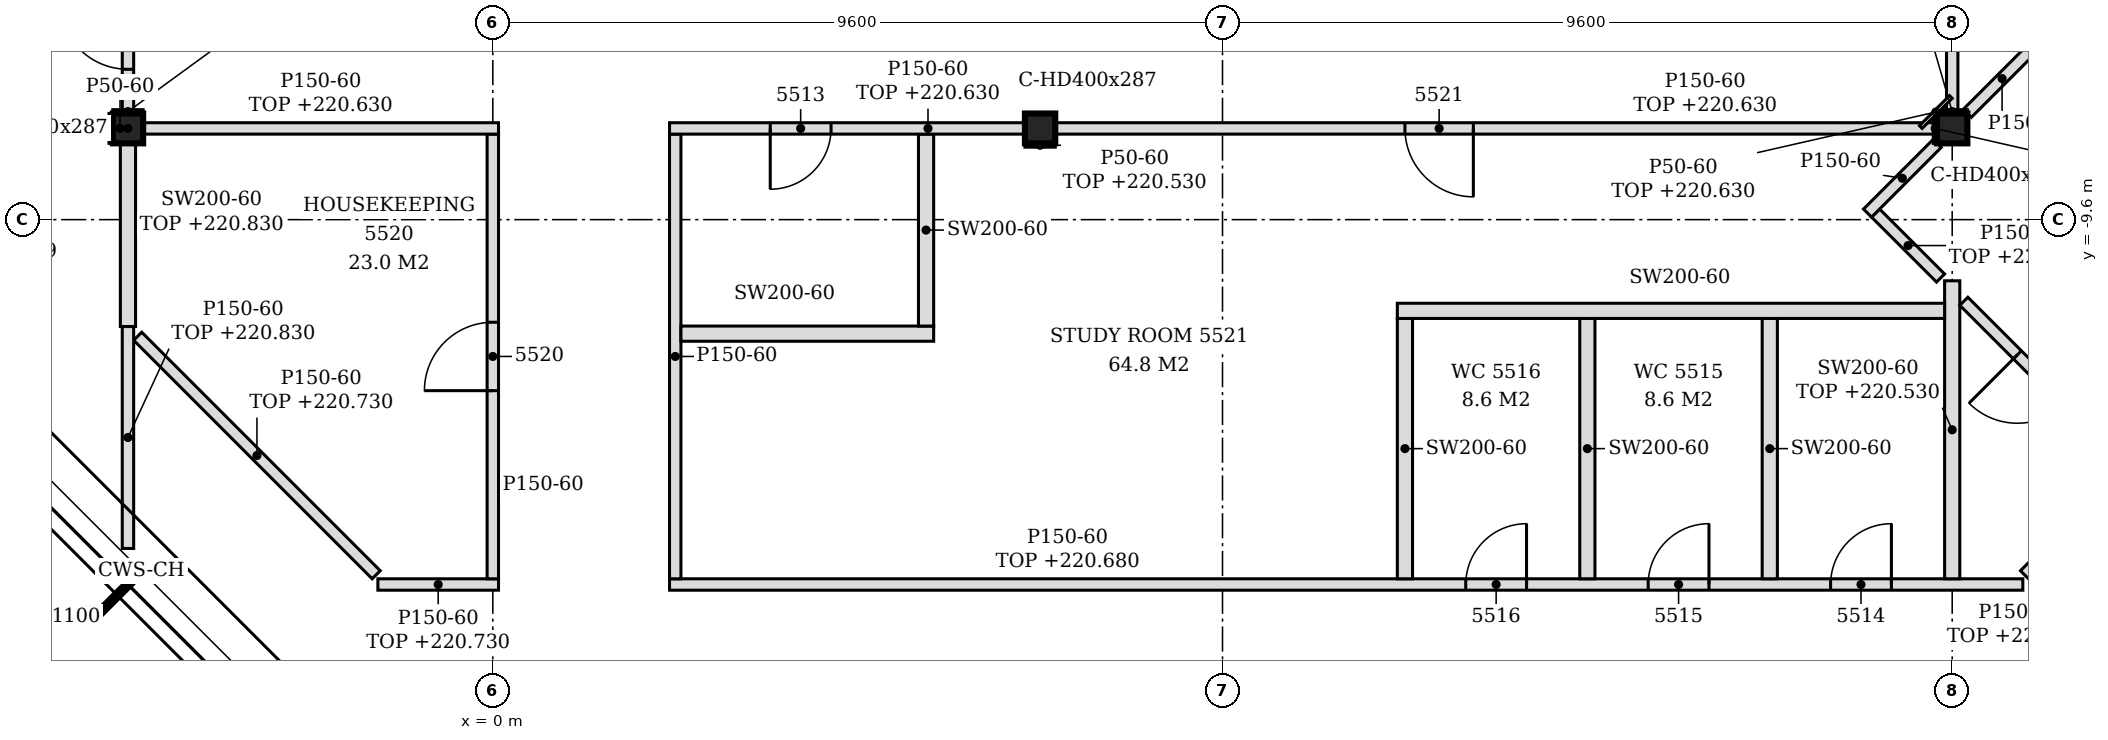
"""IFC4 building model, lengths in metres.
Left out: names, types, materials, properties, quantities, classifications, styles, units other than length and angle.
Written with IfcOpenShell. Run it as: python <this file> out.ifc"""

import sys

from ifc_helpers import new_model, si_unit, direction, frame, frame_2d, origin, origin_2d, place, context, subcontext, project, spatial, polyline, rectangle, i_section, outline, extrude, element, fill, save


model = new_model("IFC4")
c1 = context("Model", 3, precision=1e-05, world=origin(), true_north=direction((0.0, 1.0)))
c2 = subcontext(c1, "Body", "Model", "MODEL_VIEW")
j1 = project(units=[si_unit("LENGTHUNIT", "METRE"), si_unit("PLANEANGLEUNIT", "RADIAN")], contexts=[c1])
p1 = place(None, origin())
s1 = spatial("IfcSite", under=j1, at=p1, CompositionType="ELEMENT")
p2 = place(p1, origin())
s2 = spatial("IfcBuilding", under=s1, at=p2, CompositionType="ELEMENT")
p3 = place(p2, frame((0.0, 0.0, 217.8)))
s3 = spatial("IfcBuildingStorey", under=s2, at=p3, CompositionType="ELEMENT", Elevation=217.8)
for number, where, z_axis, x_axis in (
    (1, (-4.8, -8.4, -0.15), (0.0, 0.0, 1.0), (1.0, 0.0, 0.0)),
    (2, (7.2, -8.4, -0.15), (0.0, 0.0, 1.0), (1.0, 0.0, 0.0)),
    (3, (19.2, -8.4, -0.15), (0.0, 0.0, 1.0), (1.0, 0.0, 0.0)),
):
    element("IfcColumn", number, at=place(p3, frame(where, z_axis=z_axis, x_axis=x_axis)), inside=s3, PredefinedType="COLUMN", context=c2, shape_type="SweptSolid", body=[
        extrude(i_section(OverallWidth=0.399, OverallDepth=0.393, WebThickness=0.023, FlangeThickness=0.037, FilletRadius=0.015, at=origin_2d()), origin(), (0.0, 0.0, 1.0), 3.6),
    ])
p4 = place(p3, frame((-1.512, -14.4, 0.0), z_axis=(0.0, 0.0, 1.0), x_axis=(1.0, 0.0, 0.0)))
e4 = element("IfcWall", 4, at=p4, inside=s3, PredefinedType="PARTITIONING", context=c2, shape_type="SweptSolid", body=[
    extrude(rectangle(XDim=1.587, YDim=0.15, at=frame_2d((0.793, 0.0))), origin(), (0.0, 0.0, 1.0), 2.93),
])
p5 = place(p3, frame((2.325, -14.4, 0.0), z_axis=(0.0, 0.0, 1.0), x_axis=(1.0, 0.0, 0.0)))
e5 = element("IfcWall", 5, at=p5, inside=s3, PredefinedType="PARTITIONING", context=c2, shape_type="SweptSolid", body=[
    extrude(outline(polyline([(0.0, 0.0), (17.804, 0.0), (17.804, 2.88), (17.025, 2.88), (17.023, 2.73), (16.725, 2.73), (16.723, 2.88), (5.025, 2.88), (5.023, 2.73), (4.725, 2.73), (4.723, 2.88), (0.0, 2.88), (0.0, 0.0)])), frame((0.0, 0.075, 0.0), z_axis=(0.0, -1.0, 0.0), x_axis=(1.0, 0.0, 0.0)), (0.0, 0.0, 1.0), 0.15),
])
p6 = place(p5, frame((15.275, 0.0, 0.0)))
e6 = element("IfcOpeningElement", 6, at=p6, cuts=e5, PredefinedType="OPENING", context=c2, shape_type="SweptSolid", body=[
    extrude(rectangle(XDim=0.8, YDim=2.1, at=frame_2d((0.4, 1.05))), frame((0.0, 0.085, 0.0), z_axis=(0.0, -1.0, 0.0), x_axis=(1.0, 0.0, 0.0)), (0.0, 0.0, 1.0), 0.17),
])
p7 = place(p5, frame((12.875, 0.0, 0.0)))
e7 = element("IfcOpeningElement", 7, at=p7, cuts=e5, PredefinedType="OPENING", context=c2, shape_type="SweptSolid", body=[
    extrude(rectangle(XDim=0.8, YDim=2.1, at=frame_2d((0.4, 1.05))), frame((0.0, 0.085, 0.0), z_axis=(0.0, -1.0, 0.0), x_axis=(1.0, 0.0, 0.0)), (0.0, 0.0, 1.0), 0.17),
])
p8 = place(p5, frame((10.475, 0.0, 0.0)))
e8 = element("IfcOpeningElement", 8, at=p8, cuts=e5, PredefinedType="OPENING", context=c2, shape_type="SweptSolid", body=[
    extrude(rectangle(XDim=0.8, YDim=2.1, at=frame_2d((0.4, 1.05))), frame((0.0, 0.085, 0.0), z_axis=(0.0, -1.0, 0.0), x_axis=(1.0, 0.0, 0.0)), (0.0, 0.0, 1.0), 0.17),
])
p9 = place(p3, frame((-1.534, -14.272, 0.0), z_axis=(0.0, 0.0, 1.0), x_axis=(-0.707134287042, 0.707079274261, 0.0)))
e9 = element("IfcWall", 9, at=p9, inside=s3, PredefinedType="PARTITIONING", context=c2, shape_type="SweptSolid", body=[
    extrude(rectangle(XDim=4.438, YDim=0.15, at=frame_2d((2.219, 0.0))), origin(), (0.0, 0.0, 1.0), 2.93),
])
p10 = place(p3, frame((0.0, -14.325, 0.0), z_axis=(0.0, 0.0, 1.0), x_axis=(0.0, 1.0, 0.0)))
e10 = element("IfcWall", 10, at=p10, inside=s3, PredefinedType="PARTITIONING", context=c2, shape_type="SweptSolid", body=[
    extrude(outline(polyline([(0.0, 0.0), (5.85, 0.0), (5.85, 2.83), (5.775, 2.83), (5.773, 3.45), (0.025, 3.45), (0.023, 2.93), (0.0, 2.93), (0.0, 0.0)])), frame((0.0, 0.075, 0.0), z_axis=(0.0, -1.0, 0.0), x_axis=(1.0, 0.0, 0.0)), (0.0, 0.0, 1.0), 0.15),
])
p11 = place(p10, frame((2.475, 0.0, 0.0)))
e11 = element("IfcOpeningElement", 11, at=p11, cuts=e10, PredefinedType="OPENING", context=c2, shape_type="SweptSolid", body=[
    extrude(rectangle(XDim=0.9, YDim=2.1, at=frame_2d((0.45, 1.05))), frame((0.0, 0.085, 0.0), z_axis=(0.0, -1.0, 0.0), x_axis=(1.0, 0.0, 0.0)), (0.0, 0.0, 1.0), 0.17),
])
p12 = place(p3, frame((2.4, -14.325, 0.0), z_axis=(0.0, 0.0, 1.0), x_axis=(0.0, 1.0, 0.0)))
e12 = element("IfcWall", 12, at=p12, inside=s3, PredefinedType="PARTITIONING", context=c2, shape_type="SweptSolid", body=[
    extrude(outline(polyline([(0.0, 0.0), (5.85, 0.0), (5.85, 2.83), (5.775, 2.83), (5.773, 3.45), (0.025, 3.45), (0.023, 2.93), (0.0, 2.93), (0.0, 0.0)])), frame((0.0, 0.075, 0.0), z_axis=(0.0, -1.0, 0.0), x_axis=(1.0, 0.0, 0.0)), (0.0, 0.0, 1.0), 0.15),
])
for number, where, z_axis, x_axis in (
    (13, (12.0, -14.325, 0.0), (0.0, 0.0, 1.0), (0.0, 1.0, 0.0)),
    (14, (14.4, -14.325, 0.0), (0.0, 0.0, 1.0), (0.0, 1.0, 0.0)),
    (15, (16.8, -14.325, 0.0), (0.0, 0.0, 1.0), (0.0, 1.0, 0.0)),
):
    element("IfcWall", number, at=place(p3, frame(where, z_axis=z_axis, x_axis=x_axis)), inside=s3, PredefinedType="PARTITIONING", context=c2, shape_type="SweptSolid", body=[
        extrude(outline(polyline([(0.0, 0.0), (3.425, 0.0), (3.425, 3.45), (0.03, 3.45), (0.028, 2.88), (0.0, 2.88), (0.0, 0.0)])), frame((0.0, 0.1, 0.0), z_axis=(0.0, -1.0, 0.0), x_axis=(1.0, 0.0, 0.0)), (0.0, 0.0, 1.0), 0.2),
    ])
p13 = place(p3, frame((19.2, -14.325, 0.0), z_axis=(0.0, 0.0, 1.0), x_axis=(0.0, 1.0, 0.0)))
e16 = element("IfcWall", 16, at=p13, inside=s3, PredefinedType="PARTITIONING", context=c2, shape_type="SweptSolid", body=[
    extrude(rectangle(XDim=3.92, YDim=0.2, at=frame_2d((1.96, 0.0))), origin(), (0.0, 0.0, 1.0), 2.73),
])
p14 = place(p3, frame((20.151, -14.272, 0.0), z_axis=(0.0, 0.0, 1.0), x_axis=(0.707106781187, 0.707106781187, 0.0)))
e17 = element("IfcWall", 17, at=p14, inside=s3, PredefinedType="PARTITIONING", context=c2, shape_type="SweptSolid", body=[
    extrude(rectangle(XDim=2.055, YDim=0.15, at=frame_2d((1.027, 0.0))), origin(), (0.0, 0.0, 1.0), 2.88),
])
p15 = place(p3, frame((-4.8, -13.926, 0.0), z_axis=(0.0, 0.0, 1.0), x_axis=(0.0, 1.0, 0.0)))
e18 = element("IfcWall", 18, at=p15, inside=s3, PredefinedType="PARTITIONING", context=c2, shape_type="SweptSolid", body=[
    extrude(outline(polyline([(0.0, 0.0), (2.92, 0.0), (2.92, 3.03), (1.369, 3.03), (1.367, 2.63), (0.229, 2.63), (0.227, 3.03), (0.0, 3.03), (0.0, 0.0)])), frame((0.0, 0.075, 0.0), z_axis=(0.0, -1.0, 0.0), x_axis=(1.0, 0.0, 0.0)), (0.0, 0.0, 1.0), 0.15),
])
p16 = place(p3, frame((21.498, -12.819, 0.0), z_axis=(0.0, 0.0, 1.0), x_axis=(-0.707106781187, 0.707106781187, 0.0)))
e19 = element("IfcWall", 19, at=p16, inside=s3, PredefinedType="PARTITIONING", context=c2, shape_type="SweptSolid", body=[
    extrude(rectangle(XDim=3.033, YDim=0.15, at=frame_2d((1.517, 0.0))), origin(), (0.0, 0.0, 1.0), 2.73),
])
p17 = place(p16, frame((1.137, 0.0, 0.0)))
e20 = element("IfcOpeningElement", 20, at=p17, cuts=e19, PredefinedType="OPENING", context=c2, shape_type="SweptSolid", body=[
    extrude(rectangle(XDim=0.9, YDim=2.1, at=frame_2d((0.45, 1.05))), frame((0.0, 0.085, 0.0), z_axis=(0.0, -1.0, 0.0), x_axis=(1.0, 0.0, 0.0)), (0.0, 0.0, 1.0), 0.17),
])
p18 = place(p3, frame((2.475, -11.1, 0.0), z_axis=(0.0, 0.0, 1.0), x_axis=(1.0, 0.0, 0.0)))
e21 = element("IfcWall", 21, at=p18, inside=s3, PredefinedType="PARTITIONING", context=c2, shape_type="SweptSolid", body=[
    extrude(rectangle(XDim=3.325, YDim=0.2, at=frame_2d((1.663, 0.0))), origin(), (0.0, 0.0, 1.0), 3.45),
])
p19 = place(p3, frame((-4.8, -11.006, 0.0), z_axis=(0.0, 0.0, 1.0), x_axis=(0.0, 1.0, 0.0)))
e22 = element("IfcWall", 22, at=p19, inside=s3, PredefinedType="PARTITIONING", context=c2, shape_type="SweptSolid", body=[
    extrude(rectangle(XDim=2.41, YDim=0.2, at=frame_2d((1.205, 0.0))), origin(), (0.0, 0.0, 1.0), 3.03),
])
p20 = place(p3, frame((5.7, -11.0, 0.0), z_axis=(0.0, 0.0, 1.0), x_axis=(0.0, 1.0, 0.0)))
e23 = element("IfcWall", 23, at=p20, inside=s3, PredefinedType="PARTITIONING", context=c2, shape_type="SweptSolid", body=[
    extrude(outline(polyline([(0.0, 0.0), (2.525, 0.0), (2.525, 2.83), (2.45, 2.83), (2.448, 3.45), (0.0, 3.45), (0.0, 0.0)])), frame((0.0, 0.1, 0.0), z_axis=(0.0, -1.0, 0.0), x_axis=(1.0, 0.0, 0.0)), (0.0, 0.0, 1.0), 0.2),
])
p21 = place(p3, frame((11.9, -10.8, 0.0), z_axis=(0.0, 0.0, 1.0), x_axis=(1.0, 0.0, 0.0)))
e24 = element("IfcWall", 24, at=p21, inside=s3, PredefinedType="PARTITIONING", context=c2, shape_type="SweptSolid", body=[
    extrude(outline(polyline([(0.0, 0.0), (7.2, 0.0), (7.2, 2.73), (7.15, 2.73), (7.148, 3.45), (0.0, 3.45), (0.0, 0.0)])), frame((0.0, 0.1, 0.0), z_axis=(0.0, -1.0, 0.0), x_axis=(1.0, 0.0, 0.0)), (0.0, 0.0, 1.0), 0.2),
])
p22 = place(p3, frame((19.047, -10.368, 0.0), z_axis=(0.0, 0.0, 1.0), x_axis=(-0.707409718716, 0.706803713817, 0.0)))
e25 = element("IfcWall", 25, at=p22, inside=s3, PredefinedType="PARTITIONING", context=c2, shape_type="SweptSolid", body=[
    extrude(rectangle(XDim=1.208, YDim=0.15, at=frame_2d((0.604, 0.0))), origin(), (0.0, 0.0, 1.0), 2.73),
])
p23 = place(p3, frame((18.086, -9.514, 0.0), z_axis=(0.0, 0.0, 1.0), x_axis=(0.707106781187, 0.707106781187, 0.0)))
e26 = element("IfcWall", 26, at=p23, inside=s3, PredefinedType="PARTITIONING", context=c2, shape_type="SweptSolid", body=[
    extrude(rectangle(XDim=1.295, YDim=0.15, at=frame_2d((0.648, 0.0))), origin(), (0.0, 0.0, 1.0), 3.45),
])
p24 = place(p3, frame((-4.601, -8.4, 0.0), z_axis=(0.0, 0.0, 1.0), x_axis=(1.0, 0.0, 0.0)))
e27 = element("IfcWall", 27, at=p24, inside=s3, PredefinedType="PARTITIONING", context=c2, shape_type="SweptSolid", body=[
    extrude(rectangle(XDim=4.676, YDim=0.15, at=frame_2d((2.338, 0.0))), origin(), (0.0, 0.0, 1.0), 2.83),
])
p25 = place(p3, frame((2.325, -8.4, 0.0), z_axis=(0.0, 0.0, 1.0), x_axis=(1.0, 0.0, 0.0)))
e28 = element("IfcWall", 28, at=p25, inside=s3, PredefinedType="PARTITIONING", context=c2, shape_type="SweptSolid", body=[
    extrude(rectangle(XDim=4.676, YDim=0.15, at=frame_2d((2.338, 0.0))), origin(), (0.0, 0.0, 1.0), 2.83),
])
p26 = place(p25, frame((1.325, 0.0, 0.0)))
e29 = element("IfcOpeningElement", 29, at=p26, cuts=e28, PredefinedType="OPENING", context=c2, shape_type="SweptSolid", body=[
    extrude(rectangle(XDim=0.8, YDim=2.1, at=frame_2d((0.4, 1.05))), frame((0.0, 0.085, 0.0), z_axis=(0.0, -1.0, 0.0), x_axis=(1.0, 0.0, 0.0)), (0.0, 0.0, 1.0), 0.17),
])
p27 = place(p3, frame((7.399, -8.4, 0.0), z_axis=(0.0, 0.0, 1.0), x_axis=(1.0, 0.0, 0.0)))
e30 = element("IfcWall", 30, at=p27, inside=s3, PredefinedType="PARTITIONING", context=c2, shape_type="SweptSolid", body=[
    extrude(rectangle(XDim=11.601, YDim=0.15, at=frame_2d((5.801, 0.0))), origin(), (0.0, 0.0, 1.0), 2.83),
])
p28 = place(p27, frame((4.601, 0.0, 0.0)))
e31 = element("IfcOpeningElement", 31, at=p28, cuts=e30, PredefinedType="OPENING", context=c2, shape_type="SweptSolid", body=[
    extrude(rectangle(XDim=0.9, YDim=2.1, at=frame_2d((0.45, 1.05))), frame((0.0, 0.085, 0.0), z_axis=(0.0, -1.0, 0.0), x_axis=(1.0, 0.0, 0.0)), (0.0, 0.0, 1.0), 0.17),
])
p29 = place(p3, frame((-4.8, -8.204, 0.0), z_axis=(0.0, 0.0, 1.0), x_axis=(0.0, 1.0, 0.0)))
e32 = element("IfcWall", 32, at=p29, inside=s3, PredefinedType="PARTITIONING", context=c2, shape_type="SweptSolid", body=[
    extrude(rectangle(XDim=10.407, YDim=0.15, at=frame_2d((5.204, 0.0))), origin(), (0.0, 0.0, 1.0), 2.83),
])
p30 = place(p29, frame((7.154, 0.0, 0.0)))
e33 = element("IfcOpeningElement", 33, at=p30, cuts=e32, PredefinedType="OPENING", context=c2, shape_type="SweptSolid", body=[
    extrude(rectangle(XDim=0.9, YDim=2.1, at=frame_2d((0.45, 1.05))), frame((0.0, 0.085, 0.0), z_axis=(0.0, -1.0, 0.0), x_axis=(1.0, 0.0, 0.0)), (0.0, 0.0, 1.0), 0.17),
])
p31 = place(p29, frame((0.582, 0.0, 0.0)))
e34 = element("IfcOpeningElement", 34, at=p31, cuts=e32, PredefinedType="OPENING", context=c2, shape_type="SweptSolid", body=[
    extrude(rectangle(XDim=0.9, YDim=2.1, at=frame_2d((0.45, 1.05))), frame((0.0, 0.085, 0.0), z_axis=(0.0, -1.0, 0.0), x_axis=(1.0, 0.0, 0.0)), (0.0, 0.0, 1.0), 0.17),
])
p32 = place(p3, frame((19.2, -8.204, 0.0), z_axis=(0.0, 0.0, 1.0), x_axis=(0.0, 1.0, 0.0)))
e35 = element("IfcWall", 35, at=p32, inside=s3, PredefinedType="PARTITIONING", context=c2, shape_type="SweptSolid", body=[
    extrude(rectangle(XDim=4.529, YDim=0.15, at=frame_2d((2.264, 0.0))), origin(), (0.0, 0.0, 1.0), 2.83),
])
p33 = place(p3, frame((19.398, -8.202, 0.0), z_axis=(0.0, 0.0, 1.0), x_axis=(0.707200993001, 0.707012556818, 0.0)))
e36 = element("IfcWall", 36, at=p33, inside=s3, PredefinedType="PARTITIONING", context=c2, shape_type="SweptSolid", body=[
    extrude(rectangle(XDim=1.296, YDim=0.15, at=frame_2d((0.648, 0.0))), origin(), (0.0, 0.0, 1.0), 3.45),
])
p34 = place(p3, frame((-5.024, -8.596, 0.0), z_axis=(0.0, 0.0, 1.0), x_axis=(0.0, 1.0, 0.0)))
e37 = element("IfcWall", 37, at=p34, inside=s3, PredefinedType="PARTITIONING", context=c2, shape_type="SweptSolid", body=[
    extrude(rectangle(XDim=0.393, YDim=0.05, at=frame_2d((0.196, 0.0))), origin(), (0.0, 0.0, 1.0), 3.45),
])
p35 = place(p3, frame((18.786, -8.382, 0.0), z_axis=(0.0, 0.0, 1.0), x_axis=(0.707106781187, 0.707106781187, 0.0)))
e38 = element("IfcWall", 38, at=p35, inside=s3, PredefinedType="PARTITIONING", context=c2, shape_type="SweptSolid", body=[
    extrude(rectangle(XDim=0.56, YDim=0.05, at=frame_2d((0.28, 0.0))), origin(), (0.0, 0.0, 1.0), 2.83),
])
p36 = place(p3, frame((-5.0, -8.178, 0.0), z_axis=(0.0, 0.0, 1.0), x_axis=(1.0, 0.0, 0.0)))
e39 = element("IfcWall", 39, at=p36, inside=s3, PredefinedType="PARTITIONING", context=c2, shape_type="SweptSolid", body=[
    extrude(rectangle(XDim=0.399, YDim=0.05, at=frame_2d((0.199, 0.0))), origin(), (0.0, 0.0, 1.0), 2.83),
])
p37 = place(p3, frame((7.0, -8.622, 0.0), z_axis=(0.0, 0.0, 1.0), x_axis=(1.0, 0.0, 0.0)))
e40 = element("IfcWall", 40, at=p37, inside=s3, PredefinedType="PARTITIONING", context=c2, shape_type="SweptSolid", body=[
    extrude(rectangle(XDim=0.399, YDim=0.05, at=frame_2d((0.199, 0.0))), origin(), (0.0, 0.0, 1.0), 2.73),
])
p38 = place(p3, frame((19.0, -8.178, 0.0), z_axis=(0.0, 0.0, 1.0), x_axis=(1.0, 0.0, 0.0)))
e41 = element("IfcWall", 41, at=p38, inside=s3, PredefinedType="PARTITIONING", context=c2, shape_type="SweptSolid", body=[
    extrude(rectangle(XDim=0.399, YDim=0.05, at=frame_2d((0.199, 0.0))), origin(), (0.0, 0.0, 1.0), 2.83),
])
p39 = place(p3, frame((18.976, -8.596, 0.0), z_axis=(0.0, 0.0, 1.0), x_axis=(0.0, 1.0, 0.0)))
e42 = element("IfcWall", 42, at=p39, inside=s3, PredefinedType="PARTITIONING", context=c2, shape_type="SweptSolid", body=[
    extrude(rectangle(XDim=0.393, YDim=0.05, at=frame_2d((0.196, 0.0))), origin(), (0.0, 0.0, 1.0), 2.83),
])
p40 = place(p31, origin())
e43 = element("IfcDoor", 43, at=p40, inside=s3, OperationType="SINGLE_SWING_RIGHT", PredefinedType="DOOR", context=c2, shape_type="SweptSolid", body=[
    extrude(rectangle(XDim=0.9, YDim=2.1, at=frame_2d((0.45, 1.05))), frame((0.0, 0.025, 0.0), z_axis=(0.0, -1.0, 0.0), x_axis=(1.0, 0.0, 0.0)), (0.0, 0.0, 1.0), 0.05),
])
fill(e34, e43)
p41 = place(p26, frame((0.8, 0.0, 0.0), z_axis=(0.0, 0.0, 1.0), x_axis=(-1.0, 0.0, 0.0)))
e44 = element("IfcDoor", 44, at=p41, inside=s3, OperationType="SINGLE_SWING_RIGHT", PredefinedType="DOOR", context=c2, shape_type="SweptSolid", body=[
    extrude(rectangle(XDim=0.8, YDim=2.1, at=frame_2d((0.4, 1.05))), frame((0.0, 0.025, 0.0), z_axis=(0.0, -1.0, 0.0), x_axis=(1.0, 0.0, 0.0)), (0.0, 0.0, 1.0), 0.05),
])
fill(e29, e44)
p42 = place(p6, origin())
e45 = element("IfcDoor", 45, at=p42, inside=s3, OperationType="SINGLE_SWING_RIGHT", PredefinedType="DOOR", context=c2, shape_type="SweptSolid", body=[
    extrude(rectangle(XDim=0.8, YDim=2.1, at=frame_2d((0.4, 1.05))), frame((0.0, 0.025, 0.0), z_axis=(0.0, -1.0, 0.0), x_axis=(1.0, 0.0, 0.0)), (0.0, 0.0, 1.0), 0.05),
])
fill(e6, e45)
p43 = place(p7, origin())
e46 = element("IfcDoor", 46, at=p43, inside=s3, OperationType="SINGLE_SWING_RIGHT", PredefinedType="DOOR", context=c2, shape_type="SweptSolid", body=[
    extrude(rectangle(XDim=0.8, YDim=2.1, at=frame_2d((0.4, 1.05))), frame((0.0, 0.025, 0.0), z_axis=(0.0, -1.0, 0.0), x_axis=(1.0, 0.0, 0.0)), (0.0, 0.0, 1.0), 0.05),
])
fill(e7, e46)
p44 = place(p8, origin())
e47 = element("IfcDoor", 47, at=p44, inside=s3, OperationType="SINGLE_SWING_RIGHT", PredefinedType="DOOR", context=c2, shape_type="SweptSolid", body=[
    extrude(rectangle(XDim=0.8, YDim=2.1, at=frame_2d((0.4, 1.05))), frame((0.0, 0.025, 0.0), z_axis=(0.0, -1.0, 0.0), x_axis=(1.0, 0.0, 0.0)), (0.0, 0.0, 1.0), 0.05),
])
fill(e8, e47)
p45 = place(p17, origin())
e48 = element("IfcDoor", 48, at=p45, inside=s3, OperationType="SINGLE_SWING_RIGHT", PredefinedType="DOOR", context=c2, shape_type="SweptSolid", body=[
    extrude(rectangle(XDim=0.9, YDim=2.1, at=frame_2d((0.45, 1.05))), frame((0.0, 0.025, 0.0), z_axis=(0.0, -1.0, 0.0), x_axis=(1.0, 0.0, 0.0)), (0.0, 0.0, 1.0), 0.05),
])
fill(e20, e48)
p46 = place(p11, origin())
e49 = element("IfcDoor", 49, at=p46, inside=s3, OperationType="SINGLE_SWING_LEFT", PredefinedType="DOOR", context=c2, shape_type="SweptSolid", body=[
    extrude(rectangle(XDim=0.9, YDim=2.1, at=frame_2d((0.45, 1.05))), frame((0.0, 0.025, 0.0), z_axis=(0.0, -1.0, 0.0), x_axis=(1.0, 0.0, 0.0)), (0.0, 0.0, 1.0), 0.05),
])
fill(e11, e49)
p47 = place(p28, frame((0.9, 0.0, 0.0), z_axis=(0.0, 0.0, 1.0), x_axis=(-1.0, 0.0, 0.0)))
e50 = element("IfcDoor", 50, at=p47, inside=s3, OperationType="SINGLE_SWING_LEFT", PredefinedType="DOOR", context=c2, shape_type="SweptSolid", body=[
    extrude(rectangle(XDim=0.9, YDim=2.1, at=frame_2d((0.45, 1.05))), frame((0.0, 0.025, 0.0), z_axis=(0.0, -1.0, 0.0), x_axis=(1.0, 0.0, 0.0)), (0.0, 0.0, 1.0), 0.05),
])
fill(e31, e50)
save(model, sys.argv[1])
